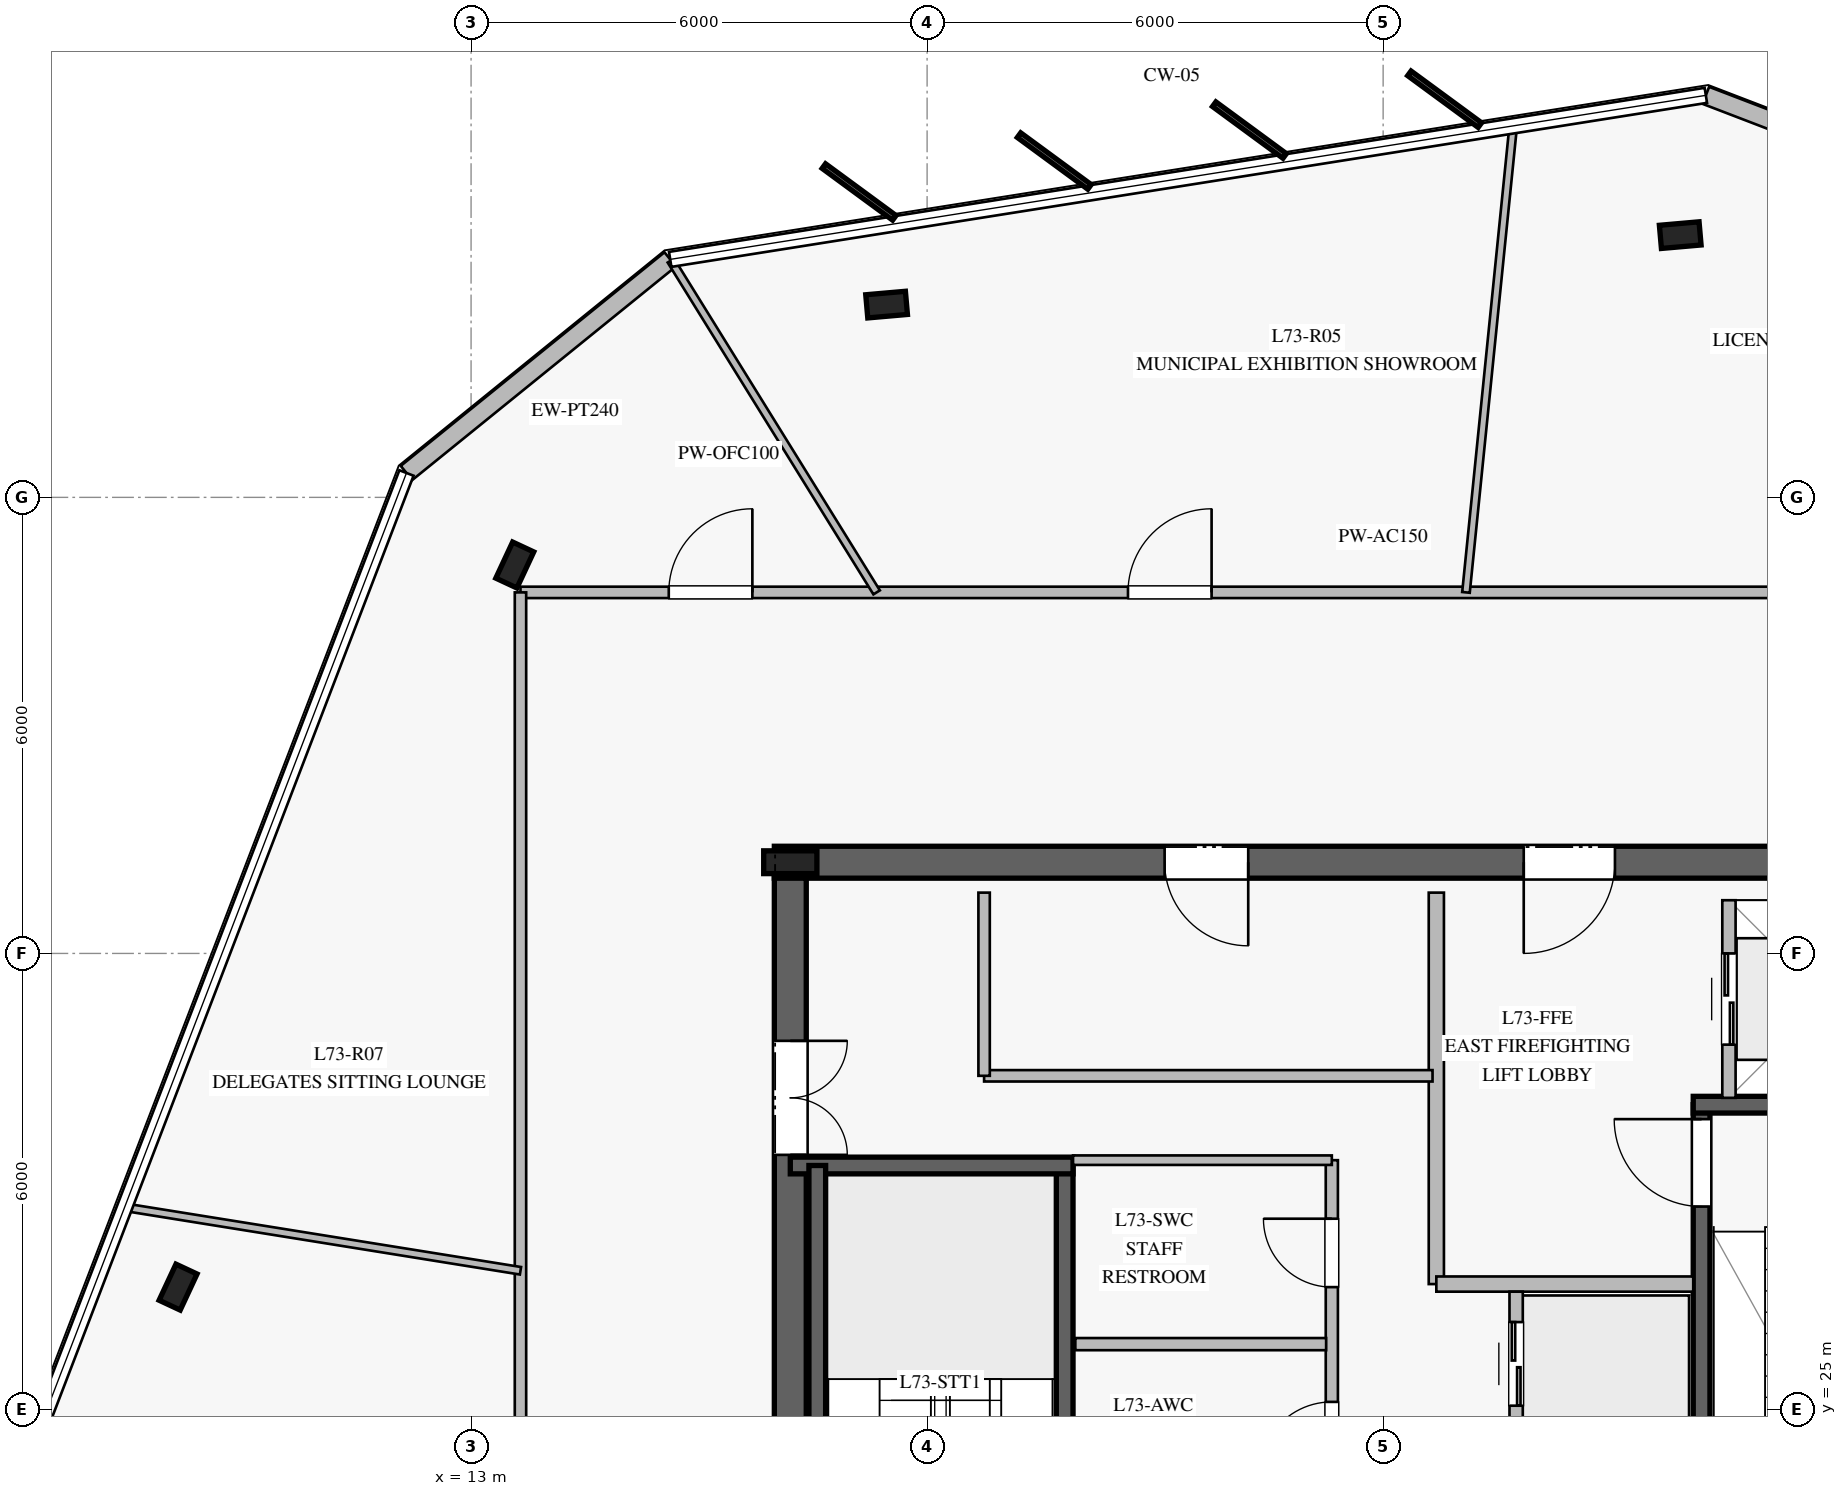
"""IFC4 building model, lengths in metres.
Left out: names, types, materials, properties, quantities, classifications, styles, units other than length and angle.
Written with IfcOpenShell. Run it as: python <this file> out.ifc"""

import sys

from ifc_helpers import new_model, si_unit, direction, frame, frame_2d, origin, origin_2d, place, context, subcontext, project, spatial, rectangle, i_section, extrude, element, fill, save


model = new_model("IFC4")
c1 = context("Model", 3, precision=1e-05, world=origin(), true_north=direction((0.0, 1.0)))
c2 = subcontext(c1, "Body", "Model", "MODEL_VIEW")
j1 = project(units=[si_unit("LENGTHUNIT", "METRE"), si_unit("PLANEANGLEUNIT", "RADIAN")], contexts=[c1])
p1 = place(None, origin())
s1 = spatial("IfcSite", under=j1, at=p1, CompositionType="ELEMENT")
p2 = place(p1, origin())
s2 = spatial("IfcBuilding", under=s1, at=p2, CompositionType="ELEMENT")
p3 = place(p2, frame((0.0, 0.0, 302.2)))
s3 = spatial("IfcBuildingStorey", under=s2, at=p3, CompositionType="ELEMENT", Elevation=302.2)
p4 = place(p3, frame((33.01, 32.2, 0.0), z_axis=(0.0, 0.0, 1.0), x_axis=(-1.0, 0.0, 0.0)))
e1 = element("IfcWall", 1, at=p4, inside=s3, PredefinedType="SHEAR", context=c2, shape_type="SweptSolid", body=[
    extrude(rectangle(XDim=16.02, YDim=0.42, at=frame_2d((8.01, 0.0))), origin(), (0.0, 0.0, 1.0), 3.78),
])
p5 = place(p4, frame((4.96, 0.0, 0.0)))
e2 = element("IfcOpeningElement", 2, at=p5, cuts=e1, PredefinedType="OPENING", context=c2, shape_type="SweptSolid", body=[
    extrude(rectangle(XDim=1.2, YDim=2.25, at=frame_2d((0.6, 1.125))), frame((0.0, 0.22, 0.0), z_axis=(0.0, -1.0, 0.0), x_axis=(1.0, 0.0, 0.0)), (0.0, 0.0, 1.0), 0.44),
])
p6 = place(p4, frame((9.785, 0.0, 0.0)))
e3 = element("IfcOpeningElement", 3, at=p6, cuts=e1, PredefinedType="OPENING", context=c2, shape_type="SweptSolid", body=[
    extrude(rectangle(XDim=1.1, YDim=2.2, at=frame_2d((0.55, 1.1))), frame((0.0, 0.22, 0.0), z_axis=(0.0, -1.0, 0.0), x_axis=(1.0, 0.0, 0.0)), (0.0, 0.0, 1.0), 0.44),
])
p7 = place(p3, frame((17.2, 31.99, 0.0), z_axis=(0.0, 0.0, 1.0), x_axis=(0.0, -1.0, 0.0)))
e4 = element("IfcWall", 4, at=p7, inside=s3, PredefinedType="SHEAR", context=c2, shape_type="SweptSolid", body=[
    extrude(rectangle(XDim=13.98, YDim=0.42, at=frame_2d((6.99, 0.0))), origin(), (0.0, 0.0, 1.0), 3.78),
])
p8 = place(p7, frame((2.14, 0.0, 0.0)))
e5 = element("IfcOpeningElement", 5, at=p8, cuts=e4, PredefinedType="OPENING", context=c2, shape_type="SweptSolid", body=[
    extrude(rectangle(XDim=1.5, YDim=2.2, at=frame_2d((0.75, 1.1))), frame((0.0, 0.22, 0.0), z_axis=(0.0, -1.0, 0.0), x_axis=(1.0, 0.0, 0.0)), (0.0, 0.0, 1.0), 0.44),
])
p9 = place(p3, frame((17.2, 32.2, 0.0), z_axis=(0.0, 0.0, 1.0), x_axis=(1.0, 0.0, 0.0)))
e6 = element("IfcColumn", 6, at=p9, inside=s3, PredefinedType="COLUMN", context=c2, shape_type="SweptSolid", body=[
    extrude(i_section(OverallWidth=0.3, OverallDepth=0.7, WebThickness=0.017, FlangeThickness=0.032, at=origin_2d()), origin(), (0.0, 0.0, 1.0), 4.0),
])
p10 = place(p3, frame((20.81, 20.99, 0.0), z_axis=(0.0, 0.0, 1.0), x_axis=(0.0, 1.0, 0.0)))
e7 = element("IfcWall", 7, at=p10, inside=s3, PredefinedType="SOLIDWALL", context=c2, shape_type="SweptSolid", body=[
    extrude(rectangle(XDim=7.22, YDim=0.22, at=frame_2d((3.61, 0.0))), origin(), (0.0, 0.0, 1.0), 3.78),
])
p11 = place(p10, frame((0.18, 0.0, 0.0)))
e8 = element("IfcOpeningElement", 8, at=p11, cuts=e7, PredefinedType="OPENING", context=c2, shape_type="SweptSolid", body=[
    extrude(rectangle(XDim=1.15, YDim=2.2, at=frame_2d((0.575, 1.1))), frame((0.0, 0.12, 0.0), z_axis=(0.0, -1.0, 0.0), x_axis=(1.0, 0.0, 0.0)), (0.0, 0.0, 1.0), 0.24),
])
p12 = place(p3, frame((17.2, 28.21, 0.0), z_axis=(0.0, 0.0, 1.0), x_axis=(1.0, 0.0, 0.0)))
e9 = element("IfcWall", 9, at=p12, inside=s3, PredefinedType="SOLIDWALL", context=c2, shape_type="SweptSolid", body=[
    extrude(rectangle(XDim=3.72, YDim=0.22, at=frame_2d((1.86, 0.0))), origin(), (0.0, 0.0, 1.0), 3.78),
])
p13 = place(p3, frame((17.555, 28.21, 0.0), z_axis=(0.0, 0.0, 1.0), x_axis=(0.0, -1.0, 0.0)))
e10 = element("IfcWall", 10, at=p13, inside=s3, PredefinedType="SOLIDWALL", context=c2, shape_type="SweptSolid", body=[
    extrude(rectangle(XDim=7.22, YDim=0.22, at=frame_2d((3.61, 0.0))), origin(), (0.0, 0.0, 1.0), 3.78),
])
p14 = place(p3, frame((29.19, 21.79, 0.0), z_axis=(0.0, 0.0, 1.0), x_axis=(0.0, 1.0, 0.0)))
e11 = element("IfcWall", 11, at=p14, inside=s3, PredefinedType="SOLIDWALL", context=c2, shape_type="SweptSolid", body=[
    extrude(rectangle(XDim=7.22, YDim=0.22, at=frame_2d((3.61, 0.0))), origin(), (0.0, 0.0, 1.0), 3.78),
])
p15 = place(p14, frame((5.88, 0.0, 0.0)))
e12 = element("IfcOpeningElement", 12, at=p15, cuts=e11, PredefinedType="OPENING", context=c2, shape_type="SweptSolid", body=[
    extrude(rectangle(XDim=1.15, YDim=2.2, at=frame_2d((0.575, 1.1))), frame((0.0, 0.12, 0.0), z_axis=(0.0, -1.0, 0.0), x_axis=(1.0, 0.0, 0.0)), (0.0, 0.0, 1.0), 0.24),
])
p16 = place(p3, frame((29.08, 29.01, 0.0), z_axis=(0.0, 0.0, 1.0), x_axis=(1.0, 0.0, 0.0)))
e13 = element("IfcWall", 13, at=p16, inside=s3, PredefinedType="SOLIDWALL", context=c2, shape_type="SweptSolid", body=[
    extrude(rectangle(XDim=3.72, YDim=0.22, at=frame_2d((1.86, 0.0))), origin(), (0.0, 0.0, 1.0), 3.78),
])
for number, where, z_axis, x_axis in (
    (14, (28.909, 40.45, 0.0), (0.0, 0.0, 1.0), (0.996, 0.087, 0.0)),
    (15, (18.467, 39.536, 0.0), (0.0, 0.0, 1.0), (0.996, 0.087, 0.0)),
    (16, (13.575, 36.11, 0.0), (0.0, 0.0, 1.0), (0.423, 0.906, 0.0)),
    (17, (9.145, 26.61, 0.0), (0.0, 0.0, 1.0), (0.423, 0.906, 0.0)),
):
    element("IfcColumn", number, at=place(p3, frame(where, z_axis=z_axis, x_axis=x_axis)), inside=s3, PredefinedType="COLUMN", context=c2, shape_type="SweptSolid", body=[
        extrude(i_section(OverallWidth=0.306, OverallDepth=0.524, WebThickness=0.021, FlangeThickness=0.04, at=origin_2d()), origin(), (0.0, 0.0, 1.0), 4.0),
    ])
p17 = place(p3, frame((15.62, 40.131, 0.0), z_axis=(0.0, 0.0, 1.0), x_axis=(-0.777153187888, -0.629311467046, 0.0)))
e18 = element("IfcWall", 18, at=p17, inside=s3, PredefinedType="STANDARD", context=c2, shape_type="SweptSolid", body=[
    extrude(rectangle(XDim=4.465, YDim=0.24, at=frame_2d((2.233, 0.0))), origin(), (0.0, 0.0, 1.0), 3.78),
])
p18 = place(p3, frame((33.414, 40.69, 0.0), z_axis=(0.0, 0.0, 1.0), x_axis=(-0.933641283133, 0.358209372336, 0.0)))
e19 = element("IfcWall", 19, at=p18, inside=s3, PredefinedType="STANDARD", context=c2, shape_type="SweptSolid", body=[
    extrude(rectangle(XDim=4.464, YDim=0.24, at=frame_2d((2.232, 0.0))), origin(), (0.0, 0.0, 1.0), 3.78),
])
p19 = place(p3, frame((25.7, 26.65, 0.0), z_axis=(0.0, 0.0, 1.0), x_axis=(0.0, 1.0, 0.0)))
e20 = element("IfcWall", 20, at=p19, inside=s3, PredefinedType="PARTITIONING", context=c2, shape_type="SweptSolid", body=[
    extrude(rectangle(XDim=5.15, YDim=0.2, at=frame_2d((2.575, 0.0))), origin(), (0.0, 0.0, 1.0), 3.78),
])
p20 = place(p3, frame((25.7, 26.65, 0.0), z_axis=(0.0, 0.0, 1.0), x_axis=(1.0, 0.0, 0.0)))
e21 = element("IfcWall", 21, at=p20, inside=s3, PredefinedType="PARTITIONING", context=c2, shape_type="SweptSolid", body=[
    extrude(rectangle(XDim=3.38, YDim=0.2, at=frame_2d((1.69, 0.0))), origin(), (0.0, 0.0, 1.0), 3.78),
])
p21 = place(p3, frame((24.325, 23.35, 0.0), z_axis=(0.0, 0.0, 1.0), x_axis=(0.0, 1.0, 0.0)))
e22 = element("IfcWall", 22, at=p21, inside=s3, PredefinedType="PLUMBINGWALL", context=c2, shape_type="SweptSolid", body=[
    extrude(rectangle(XDim=4.93, YDim=0.16, at=frame_2d((2.465, 0.0))), origin(), (0.0, 0.0, 1.0), 3.78),
])
p22 = place(p21, frame((0.8, 0.0, 0.0)))
e23 = element("IfcOpeningElement", 23, at=p22, cuts=e22, PredefinedType="OPENING", context=c2, shape_type="SweptSolid", body=[
    extrude(rectangle(XDim=0.95, YDim=2.1, at=frame_2d((0.475, 1.05))), frame((0.0, 0.09, 0.0), z_axis=(0.0, -1.0, 0.0), x_axis=(1.0, 0.0, 0.0)), (0.0, 0.0, 1.0), 0.18),
])
p23 = place(p21, frame((3.26, 0.0, 0.0)))
e24 = element("IfcOpeningElement", 24, at=p23, cuts=e22, PredefinedType="OPENING", context=c2, shape_type="SweptSolid", body=[
    extrude(rectangle(XDim=0.9, YDim=2.1, at=frame_2d((0.45, 1.05))), frame((0.0, 0.09, 0.0), z_axis=(0.0, -1.0, 0.0), x_axis=(1.0, 0.0, 0.0)), (0.0, 0.0, 1.0), 0.18),
])
p24 = place(p3, frame((20.92, 28.28, 0.0), z_axis=(0.0, 0.0, 1.0), x_axis=(1.0, 0.0, 0.0)))
e25 = element("IfcWall", 25, at=p24, inside=s3, PredefinedType="PARTITIONING", context=c2, shape_type="SweptSolid", body=[
    extrude(rectangle(XDim=3.405, YDim=0.125, at=frame_2d((1.703, 0.0))), origin(), (0.0, 0.0, 1.0), 3.78),
])
p25 = place(p3, frame((20.95, 25.86, 0.0), z_axis=(0.0, 0.0, 1.0), x_axis=(1.0, 0.0, 0.0)))
e26 = element("IfcWall", 26, at=p25, inside=s3, PredefinedType="PLUMBINGWALL", context=c2, shape_type="SweptSolid", body=[
    extrude(rectangle(XDim=3.3, YDim=0.16, at=frame_2d((1.65, 0.0))), origin(), (0.0, 0.0, 1.0), 3.78),
])
p26 = place(p3, frame((19.75, 29.39, 0.0), z_axis=(0.0, 0.0, 1.0), x_axis=(1.0, 0.0, 0.0)))
e27 = element("IfcWall", 27, at=p26, inside=s3, PredefinedType="PARTITIONING", context=c2, shape_type="SweptSolid", body=[
    extrude(rectangle(XDim=5.9, YDim=0.15, at=frame_2d((2.95, 0.0))), origin(), (0.0, 0.0, 1.0), 3.78),
])
p27 = place(p3, frame((19.75, 29.39, 0.0), z_axis=(0.0, 0.0, 1.0), x_axis=(0.0, 1.0, 0.0)))
e28 = element("IfcWall", 28, at=p27, inside=s3, PredefinedType="PARTITIONING", context=c2, shape_type="SweptSolid", body=[
    extrude(rectangle(XDim=2.41, YDim=0.15, at=frame_2d((1.205, 0.0))), origin(), (0.0, 0.0, 1.0), 3.78),
])
p28 = place(p3, frame((26.75, 24.65, 0.0), z_axis=(0.0, 0.0, 1.0), x_axis=(0.0, 1.0, 0.0)))
e29 = element("IfcWall", 29, at=p28, inside=s3, PredefinedType="PARTITIONING", context=c2, shape_type="SweptSolid", body=[
    extrude(rectangle(XDim=1.9, YDim=0.175, at=frame_2d((0.95, 0.0))), origin(), (0.0, 0.0, 1.0), 3.78),
])
p29 = place(p28, frame((0.4, 0.0, 0.0)))
e30 = element("IfcOpeningElement", 30, at=p29, cuts=e29, PredefinedType="OPENING", context=c2, shape_type="SweptSolid", body=[
    extrude(rectangle(XDim=1.1, YDim=2.2, at=frame_2d((0.55, 1.1))), frame((0.0, 0.098, 0.0), z_axis=(0.0, -1.0, 0.0), x_axis=(1.0, 0.0, 0.0)), (0.0, 0.0, 1.0), 0.195),
])
p30 = place(p3, frame((29.55, 29.1, 0.0), z_axis=(0.0, 0.0, 1.0), x_axis=(0.0, 1.0, 0.0)))
e31 = element("IfcWall", 31, at=p30, inside=s3, PredefinedType="PARTITIONING", context=c2, shape_type="SweptSolid", body=[
    extrude(rectangle(XDim=2.6, YDim=0.175, at=frame_2d((1.3, 0.0))), origin(), (0.0, 0.0, 1.0), 3.78),
])
p31 = place(p30, frame((0.7, 0.0, 0.0)))
e32 = element("IfcOpeningElement", 32, at=p31, cuts=e31, PredefinedType="OPENING", context=c2, shape_type="SweptSolid", body=[
    extrude(rectangle(XDim=1.2, YDim=2.2, at=frame_2d((0.6, 1.1))), frame((0.0, 0.098, 0.0), z_axis=(0.0, -1.0, 0.0), x_axis=(1.0, 0.0, 0.0)), (0.0, 0.0, 1.0), 0.195),
])
p32 = place(p3, frame((13.65, 35.75, 0.0), z_axis=(0.0, 0.0, 1.0), x_axis=(1.0, 0.0, 0.0)))
e33 = element("IfcWall", 33, at=p32, inside=s3, PredefinedType="PARTITIONING", context=c2, shape_type="SweptSolid", body=[
    extrude(rectangle(XDim=22.7, YDim=0.15, at=frame_2d((11.35, 0.0))), origin(), (0.0, 0.0, 1.0), 3.28),
])
p33 = place(p32, frame((7.993, 0.0, 0.0)))
e34 = element("IfcOpeningElement", 34, at=p33, cuts=e33, PredefinedType="OPENING", context=c2, shape_type="SweptSolid", body=[
    extrude(rectangle(XDim=1.1, YDim=2.2, at=frame_2d((0.55, 1.1))), frame((0.0, 0.085, 0.0), z_axis=(0.0, -1.0, 0.0), x_axis=(1.0, 0.0, 0.0)), (0.0, 0.0, 1.0), 0.17),
])
p34 = place(p32, frame((16.84, 0.0, 0.0)))
e35 = element("IfcOpeningElement", 35, at=p34, cuts=e33, PredefinedType="OPENING", context=c2, shape_type="SweptSolid", body=[
    extrude(rectangle(XDim=1.1, YDim=2.2, at=frame_2d((0.55, 1.1))), frame((0.0, 0.085, 0.0), z_axis=(0.0, -1.0, 0.0), x_axis=(1.0, 0.0, 0.0)), (0.0, 0.0, 1.0), 0.17),
])
p35 = place(p32, frame((1.951, 0.0, 0.0)))
e36 = element("IfcOpeningElement", 36, at=p35, cuts=e33, PredefinedType="OPENING", context=c2, shape_type="SweptSolid", body=[
    extrude(rectangle(XDim=1.1, YDim=2.2, at=frame_2d((0.55, 1.1))), frame((0.0, 0.085, 0.0), z_axis=(0.0, -1.0, 0.0), x_axis=(1.0, 0.0, 0.0)), (0.0, 0.0, 1.0), 0.17),
])
p36 = place(p3, frame((13.65, 14.25, 0.0), z_axis=(0.0, 0.0, 1.0), x_axis=(0.0, 1.0, 0.0)))
e37 = element("IfcWall", 37, at=p36, inside=s3, PredefinedType="PARTITIONING", context=c2, shape_type="SweptSolid", body=[
    extrude(rectangle(XDim=21.5, YDim=0.15, at=frame_2d((10.75, 0.0))), origin(), (0.0, 0.0, 1.0), 3.05),
])
p37 = place(p36, frame((5.837, 0.0, 0.0)))
e38 = element("IfcOpeningElement", 38, at=p37, cuts=e37, PredefinedType="OPENING", context=c2, shape_type="SweptSolid", body=[
    extrude(rectangle(XDim=1.1, YDim=2.2, at=frame_2d((0.55, 1.1))), frame((0.0, 0.085, 0.0), z_axis=(0.0, -1.0, 0.0), x_axis=(1.0, 0.0, 0.0)), (0.0, 0.0, 1.0), 0.17),
])
p38 = place(p3, frame((18.336, 35.75, 0.0), z_axis=(0.0, 0.0, 1.0), x_axis=(-0.526958206405, 0.849891198155, 0.0)))
e39 = element("IfcWall", 39, at=p38, inside=s3, PredefinedType="MOVABLE", context=c2, shape_type="SweptSolid", body=[
    extrude(rectangle(XDim=5.137, YDim=0.1, at=frame_2d((2.569, 0.0))), origin(), (0.0, 0.0, 1.0), 3.28),
])
p39 = place(p3, frame((13.65, 26.825, 0.0), z_axis=(0.0, 0.0, 1.0), x_axis=(-0.987343097262, 0.158598891199, 0.0)))
e40 = element("IfcWall", 40, at=p39, inside=s3, PredefinedType="MOVABLE", context=c2, shape_type="SweptSolid", body=[
    extrude(rectangle(XDim=5.259, YDim=0.1, at=frame_2d((2.629, 0.0))), origin(), (0.0, 0.0, 1.0), 3.28),
])
p40 = place(p3, frame((26.09, 35.75, 0.0), z_axis=(0.0, 0.0, 1.0), x_axis=(0.100753039723, 0.994911465904, 0.0)))
e41 = element("IfcWall", 41, at=p40, inside=s3, PredefinedType="MOVABLE", context=c2, shape_type="SweptSolid", body=[
    extrude(rectangle(XDim=6.152, YDim=0.1, at=frame_2d((3.076, 0.0))), origin(), (0.0, 0.0, 1.0), 3.28),
])
p41 = place(p15, origin())
e42 = element("IfcDoor", 42, at=p41, inside=s3, OperationType="SINGLE_SWING_RIGHT", PredefinedType="DOOR", context=c2, shape_type="SweptSolid", body=[
    extrude(rectangle(XDim=1.15, YDim=2.2, at=frame_2d((0.575, 1.1))), frame((0.0, 0.025, 0.0), z_axis=(0.0, -1.0, 0.0), x_axis=(1.0, 0.0, 0.0)), (0.0, 0.0, 1.0), 0.05),
])
fill(e12, e42)
p42 = place(p5, origin())
e43 = element("IfcDoor", 43, at=p42, inside=s3, OperationType="SINGLE_SWING_RIGHT", PredefinedType="DOOR", context=c2, shape_type="SweptSolid", body=[
    extrude(rectangle(XDim=1.2, YDim=2.25, at=frame_2d((0.6, 1.125))), frame((0.0, 0.025, 0.0), z_axis=(0.0, -1.0, 0.0), x_axis=(1.0, 0.0, 0.0)), (0.0, 0.0, 1.0), 0.05),
])
fill(e2, e43)
p43 = place(p8, origin())
e44 = element("IfcDoor", 44, at=p43, inside=s3, OperationType="DOUBLE_DOOR_SINGLE_SWING", PredefinedType="DOOR", context=c2, shape_type="SweptSolid", body=[
    extrude(rectangle(XDim=1.5, YDim=2.2, at=frame_2d((0.75, 1.1))), frame((0.0, 0.025, 0.0), z_axis=(0.0, -1.0, 0.0), x_axis=(1.0, 0.0, 0.0)), (0.0, 0.0, 1.0), 0.05),
])
fill(e5, e44)
p44 = place(p22, origin())
e45 = element("IfcDoor", 45, at=p44, inside=s3, OperationType="SINGLE_SWING_LEFT", PredefinedType="DOOR", context=c2, shape_type="SweptSolid", body=[
    extrude(rectangle(XDim=0.95, YDim=2.1, at=frame_2d((0.475, 1.05))), frame((0.0, 0.025, 0.0), z_axis=(0.0, -1.0, 0.0), x_axis=(1.0, 0.0, 0.0)), (0.0, 0.0, 1.0), 0.05),
])
fill(e23, e45)
p45 = place(p23, origin())
e46 = element("IfcDoor", 46, at=p45, inside=s3, OperationType="SINGLE_SWING_RIGHT", PredefinedType="DOOR", context=c2, shape_type="SweptSolid", body=[
    extrude(rectangle(XDim=0.9, YDim=2.1, at=frame_2d((0.45, 1.05))), frame((0.0, 0.025, 0.0), z_axis=(0.0, -1.0, 0.0), x_axis=(1.0, 0.0, 0.0)), (0.0, 0.0, 1.0), 0.05),
])
fill(e24, e46)
p46 = place(p6, origin())
e47 = element("IfcDoor", 47, at=p46, inside=s3, OperationType="SINGLE_SWING_LEFT", PredefinedType="DOOR", context=c2, shape_type="SweptSolid", body=[
    extrude(rectangle(XDim=1.1, YDim=2.2, at=frame_2d((0.55, 1.1))), frame((0.0, 0.025, 0.0), z_axis=(0.0, -1.0, 0.0), x_axis=(1.0, 0.0, 0.0)), (0.0, 0.0, 1.0), 0.05),
])
fill(e3, e47)
p47 = place(p29, origin())
e48 = element("IfcDoor", 48, at=p47, inside=s3, OperationType="DOUBLE_DOOR_SLIDING", PredefinedType="DOOR", context=c2, shape_type="SweptSolid", body=[
    extrude(rectangle(XDim=1.1, YDim=2.2, at=frame_2d((0.55, 1.1))), frame((0.0, 0.025, 0.0), z_axis=(0.0, -1.0, 0.0), x_axis=(1.0, 0.0, 0.0)), (0.0, 0.0, 1.0), 0.05),
])
fill(e30, e48)
p48 = place(p31, origin())
e49 = element("IfcDoor", 49, at=p48, inside=s3, OperationType="DOUBLE_DOOR_SLIDING", PredefinedType="DOOR", context=c2, shape_type="SweptSolid", body=[
    extrude(rectangle(XDim=1.2, YDim=2.2, at=frame_2d((0.6, 1.1))), frame((0.0, 0.025, 0.0), z_axis=(0.0, -1.0, 0.0), x_axis=(1.0, 0.0, 0.0)), (0.0, 0.0, 1.0), 0.05),
])
fill(e32, e49)
p49 = place(p33, origin())
e50 = element("IfcDoor", 50, at=p49, inside=s3, OperationType="SINGLE_SWING_RIGHT", PredefinedType="DOOR", context=c2, shape_type="SweptSolid", body=[
    extrude(rectangle(XDim=1.1, YDim=2.2, at=frame_2d((0.55, 1.1))), frame((0.0, 0.025, 0.0), z_axis=(0.0, -1.0, 0.0), x_axis=(1.0, 0.0, 0.0)), (0.0, 0.0, 1.0), 0.05),
])
fill(e34, e50)
p50 = place(p35, origin())
e51 = element("IfcDoor", 51, at=p50, inside=s3, OperationType="SINGLE_SWING_RIGHT", PredefinedType="DOOR", context=c2, shape_type="SweptSolid", body=[
    extrude(rectangle(XDim=1.1, YDim=2.2, at=frame_2d((0.55, 1.1))), frame((0.0, 0.025, 0.0), z_axis=(0.0, -1.0, 0.0), x_axis=(1.0, 0.0, 0.0)), (0.0, 0.0, 1.0), 0.05),
])
fill(e36, e51)
save(model, sys.argv[1])
